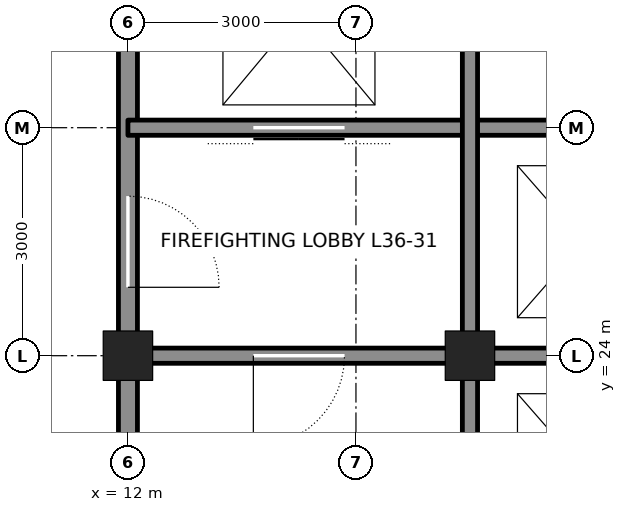
"""IFC4 building model, lengths in metres.
Left out: names, types, materials, properties, quantities, classifications, styles, units other than length and angle.
Written with IfcOpenShell. Run it as: python <this file> out.ifc"""

import sys

from ifc_helpers import new_model, si_unit, direction, frame, frame_2d, origin, origin_2d, place, context, subcontext, project, spatial, rectangle, hollow_rectangle, extrude, element, fill, save


model = new_model("IFC4")
c1 = context("Model", 3, precision=1e-05, world=origin(), true_north=direction((0.0, 1.0)))
c2 = subcontext(c1, "Body", "Model", "MODEL_VIEW")
j1 = project(units=[si_unit("LENGTHUNIT", "METRE"), si_unit("PLANEANGLEUNIT", "RADIAN")], contexts=[c1])
p1 = place(None, origin())
s1 = spatial("IfcSite", under=j1, at=p1, CompositionType="ELEMENT")
p2 = place(p1, origin())
s2 = spatial("IfcBuilding", under=s1, at=p2, CompositionType="ELEMENT")
p3 = place(p2, frame((0.0, 0.0, 165.6)))
s3 = spatial("IfcBuildingStorey", under=s2, at=p3, CompositionType="ELEMENT", Elevation=165.6)
for number, where, z_axis, x_axis in (
    (1, (12.0, 24.0, 0.0), (0.0, 0.0, 1.0), (1.0, 0.0, 0.0)),
    (2, (16.5, 24.0, 0.0), (0.0, 0.0, 1.0), (1.0, 0.0, 0.0)),
):
    element("IfcColumn", number, at=place(p3, frame(where, z_axis=z_axis, x_axis=x_axis)), inside=s3, PredefinedType="COLUMN", context=c2, shape_type="SweptSolid", body=[
        extrude(hollow_rectangle(XDim=0.65, YDim=0.65, WallThickness=0.065, at=origin_2d()), origin(), (0.0, 0.0, 1.0), 4.2),
    ])
p4 = place(p3, frame((12.0, 21.25, 0.0), z_axis=(0.0, 0.0, 1.0), x_axis=(0.0, 1.0, 0.0)))
e3 = element("IfcWall", 3, at=p4, inside=s3, PredefinedType="SOLIDWALL", context=c2, shape_type="SweptSolid", body=[
    extrude(rectangle(XDim=2.5, YDim=0.25, at=frame_2d((1.25, 0.0))), origin(), (0.0, 0.0, 1.0), 3.113),
])
p5 = place(p3, frame((12.0, 24.25, 0.0), z_axis=(0.0, 0.0, 1.0), x_axis=(0.0, 1.0, 0.0)))
e4 = element("IfcWall", 4, at=p5, inside=s3, PredefinedType="SOLIDWALL", context=c2, shape_type="SweptSolid", body=[
    extrude(rectangle(XDim=8.5, YDim=0.25, at=frame_2d((4.25, 0.0))), origin(), (0.0, 0.0, 1.0), 3.113),
])
p6 = place(p5, frame((0.65, 0.0, 0.0)))
e5 = element("IfcOpeningElement", 5, at=p6, cuts=e4, PredefinedType="OPENING", context=c2, shape_type="SweptSolid", body=[
    extrude(rectangle(XDim=1.2, YDim=2.1, at=frame_2d((0.6, 1.05))), frame((0.0, 0.135, 0.0), z_axis=(0.0, -1.0, 0.0), x_axis=(1.0, 0.0, 0.0)), (0.0, 0.0, 1.0), 0.27),
])
p7 = place(p5, frame((6.875, 0.0, 0.0)))
e6 = element("IfcOpeningElement", 6, at=p7, cuts=e4, PredefinedType="OPENING", context=c2, shape_type="SweptSolid", body=[
    extrude(rectangle(XDim=0.75, YDim=2.1, at=frame_2d((0.375, 1.05))), frame((0.0, 0.135, 0.0), z_axis=(0.0, -1.0, 0.0), x_axis=(1.0, 0.0, 0.0)), (0.0, 0.0, 1.0), 0.27),
])
p8 = place(p3, frame((12.25, 24.0, 0.0), z_axis=(0.0, 0.0, 1.0), x_axis=(1.0, 0.0, 0.0)))
e7 = element("IfcWall", 7, at=p8, inside=s3, PredefinedType="SOLIDWALL", context=c2, shape_type="SweptSolid", body=[
    extrude(rectangle(XDim=4.0, YDim=0.2, at=frame_2d((2.0, 0.0))), origin(), (0.0, 0.0, 1.0), 3.09),
])
p9 = place(p8, frame((1.4, 0.0, 0.0)))
e8 = element("IfcOpeningElement", 8, at=p9, cuts=e7, PredefinedType="OPENING", context=c2, shape_type="SweptSolid", body=[
    extrude(rectangle(XDim=1.2, YDim=2.1, at=frame_2d((0.6, 1.05))), frame((0.0, 0.11, 0.0), z_axis=(0.0, -1.0, 0.0), x_axis=(1.0, 0.0, 0.0)), (0.0, 0.0, 1.0), 0.22),
])
p10 = place(p3, frame((16.75, 24.0, 0.0), z_axis=(0.0, 0.0, 1.0), x_axis=(1.0, 0.0, 0.0)))
e9 = element("IfcWall", 9, at=p10, inside=s3, PredefinedType="SOLIDWALL", context=c2, shape_type="SweptSolid", body=[
    extrude(rectangle(XDim=2.75, YDim=0.2, at=frame_2d((1.375, 0.0))), origin(), (0.0, 0.0, 1.0), 3.09),
])
p11 = place(p3, frame((12.0, 27.0, 0.0), z_axis=(0.0, 0.0, 1.0), x_axis=(1.0, 0.0, 0.0)))
e10 = element("IfcWall", 10, at=p11, inside=s3, PredefinedType="SOLIDWALL", context=c2, shape_type="SweptSolid", body=[
    extrude(rectangle(XDim=7.5, YDim=0.2, at=frame_2d((3.75, 0.0))), origin(), (0.0, 0.0, 1.0), 4.04),
])
p12 = place(p11, frame((1.65, 0.0, 0.0)))
e11 = element("IfcOpeningElement", 11, at=p12, cuts=e10, PredefinedType="OPENING", context=c2, shape_type="SweptSolid", body=[
    extrude(rectangle(XDim=1.2, YDim=2.1, at=frame_2d((0.6, 1.05))), frame((0.0, 0.11, 0.0), z_axis=(0.0, -1.0, 0.0), x_axis=(1.0, 0.0, 0.0)), (0.0, 0.0, 1.0), 0.22),
])
p13 = place(p3, frame((16.5, 21.25, 0.0), z_axis=(0.0, 0.0, 1.0), x_axis=(0.0, 1.0, 0.0)))
e12 = element("IfcWall", 12, at=p13, inside=s3, PredefinedType="SOLIDWALL", context=c2, shape_type="SweptSolid", body=[
    extrude(rectangle(XDim=2.5, YDim=0.2, at=frame_2d((1.25, 0.0))), origin(), (0.0, 0.0, 1.0), 3.113),
])
p14 = place(p3, frame((16.5, 24.25, 0.0), z_axis=(0.0, 0.0, 1.0), x_axis=(0.0, 1.0, 0.0)))
e13 = element("IfcWall", 13, at=p14, inside=s3, PredefinedType="SOLIDWALL", context=c2, shape_type="SweptSolid", body=[
    extrude(rectangle(XDim=8.5, YDim=0.2, at=frame_2d((4.25, 0.0))), origin(), (0.0, 0.0, 1.0), 3.113),
])
p15 = place(p9, frame((1.2, 0.0, 0.0), z_axis=(0.0, 0.0, 1.0), x_axis=(-1.0, 0.0, 0.0)))
e14 = element("IfcDoor", 14, at=p15, inside=s3, OperationType="SINGLE_SWING_RIGHT", PredefinedType="DOOR", context=c2, shape_type="SweptSolid", body=[
    extrude(rectangle(XDim=1.2, YDim=2.1, at=frame_2d((0.6, 1.05))), frame((0.0, 0.025, 0.0), z_axis=(0.0, -1.0, 0.0), x_axis=(1.0, 0.0, 0.0)), (0.0, 0.0, 1.0), 0.05),
])
fill(e8, e14)
p16 = place(p6, frame((1.2, 0.0, 0.0), z_axis=(0.0, 0.0, 1.0), x_axis=(-1.0, 0.0, 0.0)))
e15 = element("IfcDoor", 15, at=p16, inside=s3, OperationType="SINGLE_SWING_RIGHT", PredefinedType="DOOR", context=c2, shape_type="SweptSolid", body=[
    extrude(rectangle(XDim=1.2, YDim=2.1, at=frame_2d((0.6, 1.05))), frame((0.0, 0.025, 0.0), z_axis=(0.0, -1.0, 0.0), x_axis=(1.0, 0.0, 0.0)), (0.0, 0.0, 1.0), 0.05),
])
fill(e5, e15)
p17 = place(p12, origin())
e16 = element("IfcDoor", 16, at=p17, inside=s3, OperationType="DOUBLE_DOOR_SLIDING", PredefinedType="DOOR", context=c2, shape_type="SweptSolid", body=[
    extrude(rectangle(XDim=1.2, YDim=2.1, at=frame_2d((0.6, 1.05))), frame((0.0, 0.025, 0.0), z_axis=(0.0, -1.0, 0.0), x_axis=(1.0, 0.0, 0.0)), (0.0, 0.0, 1.0), 0.05),
])
fill(e11, e16)
save(model, sys.argv[1])
